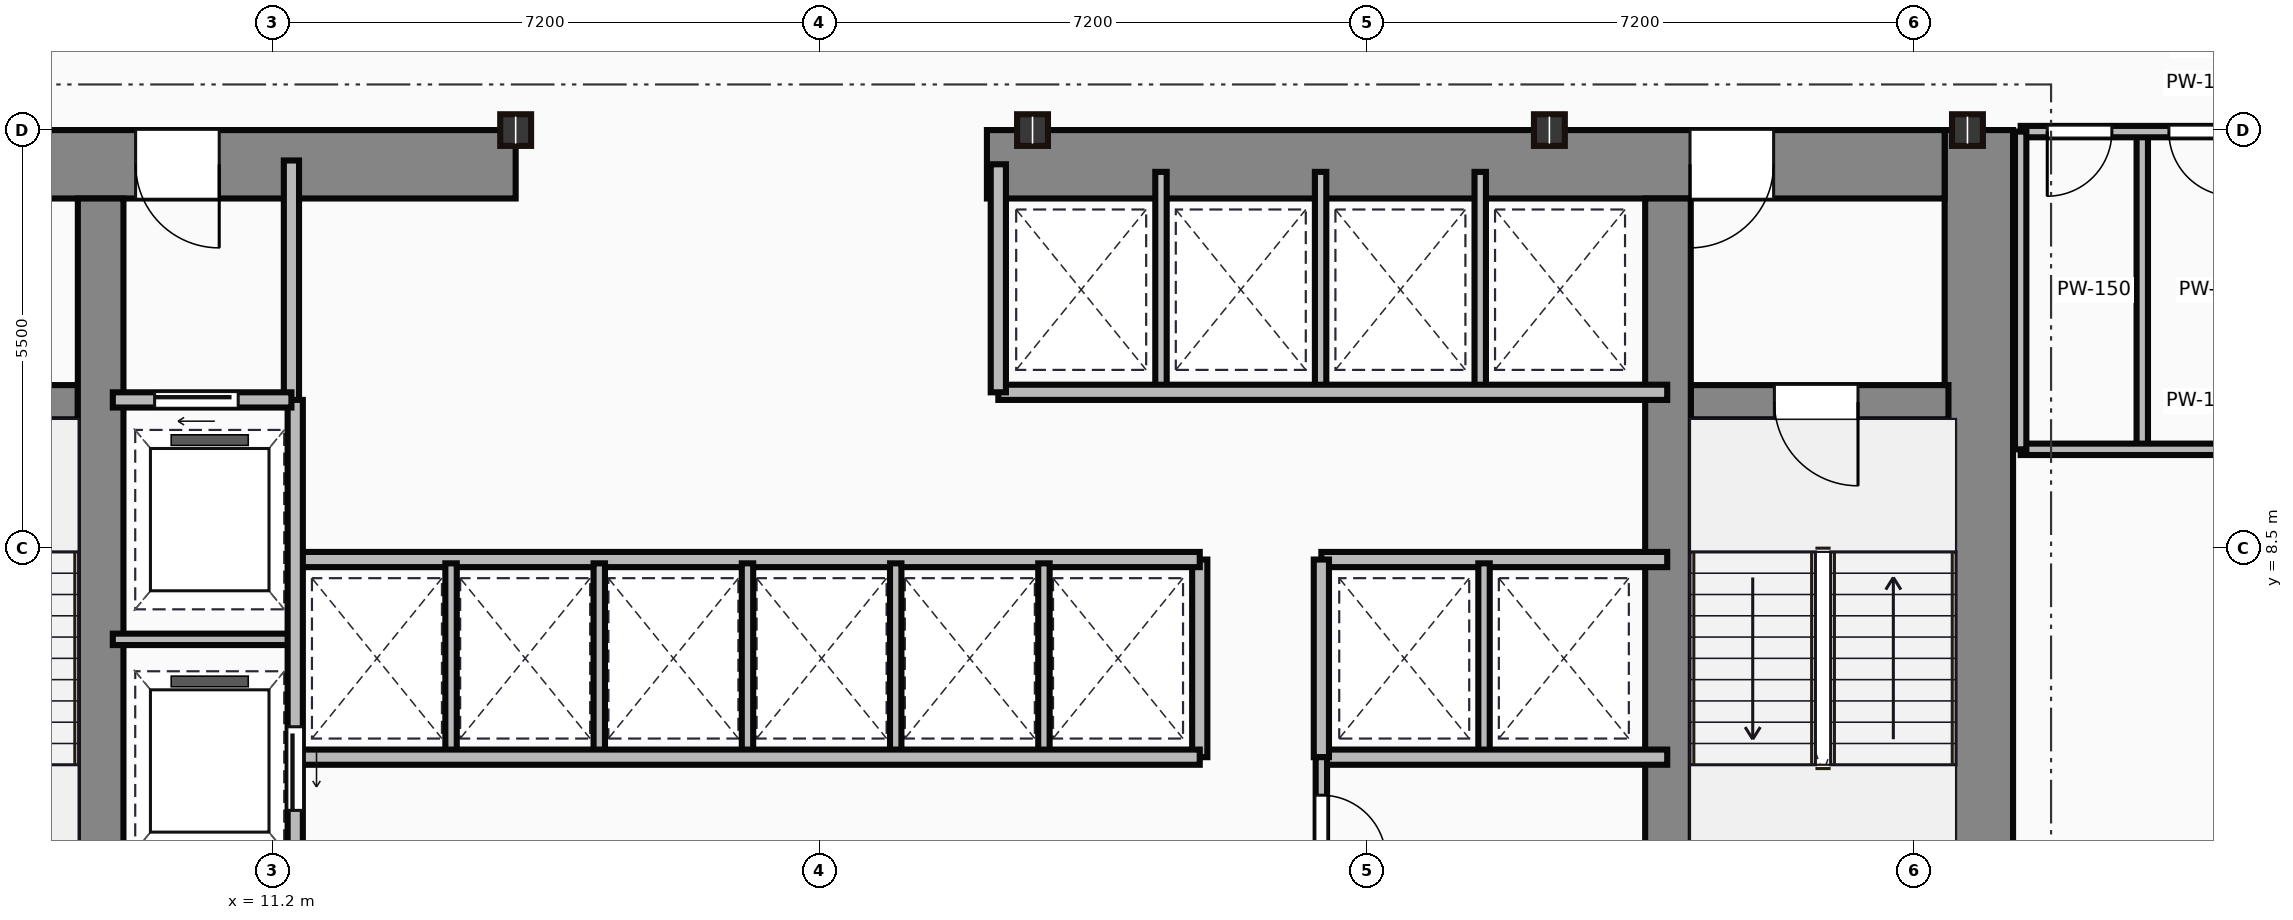
"""IFC4 building model, lengths in metres.
Left out: names, types, materials, properties, quantities, classifications, styles, units other than length and angle.
Written with IfcOpenShell. Run it as: python <this file> out.ifc"""

import sys

from ifc_helpers import new_model, si_unit, direction, frame, frame_2d, origin, origin_2d, place, context, subcontext, project, spatial, rectangle, i_section, extrude, source, transform, mapped, element, fill, save


model = new_model("IFC4")
c1 = context("Model", 3, precision=1e-05, world=origin(), true_north=direction((0.0, 1.0)))
c2 = subcontext(c1, "Body", "Model", "MODEL_VIEW")
j1 = project(units=[si_unit("LENGTHUNIT", "METRE"), si_unit("PLANEANGLEUNIT", "RADIAN")], contexts=[c1])
p1 = place(None, origin())
s1 = spatial("IfcSite", under=j1, at=p1, CompositionType="ELEMENT")
p2 = place(p1, origin())
s2 = spatial("IfcBuilding", under=s1, at=p2, CompositionType="ELEMENT")
p3 = place(p2, frame((0.0, 0.0, 39.8)))
s3 = spatial("IfcBuildingStorey", under=s2, at=p3, CompositionType="ELEMENT", Elevation=39.8)
m1 = source(origin(), c2, "Body", "SweptSolid", [
    extrude(rectangle(XDim=13.1, YDim=0.9, at=frame_2d((6.55, 0.0))), origin(), (0.0, 0.0, 1.0), 3.65),
])
p4 = place(p3, frame((33.65, 0.9, 0.0), z_axis=(0.0, 0.0, 1.0), x_axis=(0.0, 1.0, 0.0)))
e1 = element("IfcWall", 1, at=p4, inside=s3, PredefinedType="SHEAR", context=c2, shape_type="MappedRepresentation", body=[
    mapped(m1, transform((0.0, 0.0, 0.0))),
])
m2 = source(origin(), c2, "Body", "SweptSolid", [
    extrude(rectangle(XDim=9.1, YDim=0.9, at=frame_2d((4.55, 0.0))), origin(), (0.0, 0.0, 1.0), 3.65),
])
p5 = place(p3, frame((5.3, 13.55, 0.0), z_axis=(0.0, 0.0, 1.0), x_axis=(1.0, 0.0, 0.0)))
e2 = element("IfcWall", 2, at=p5, inside=s3, PredefinedType="SHEAR", context=c2, shape_type="MappedRepresentation", body=[
    mapped(m2, transform((0.0, 0.0, 0.0))),
])
p6 = place(p5, frame((4.1, 0.0, 0.0)))
e3 = element("IfcOpeningElement", 3, at=p6, cuts=e2, PredefinedType="OPENING", context=c2, shape_type="SweptSolid", body=[
    extrude(rectangle(XDim=1.1, YDim=2.15, at=frame_2d((0.55, 1.075))), frame((0.0, 0.46, 0.0), z_axis=(0.0, -1.0, 0.0), x_axis=(1.0, 0.0, 0.0)), (0.0, 0.0, 1.0), 0.92),
])
m3 = source(origin(), c2, "Body", "SweptSolid", [
    extrude(rectangle(XDim=12.6, YDim=0.9, at=frame_2d((6.3, 0.0))), origin(), (0.0, 0.0, 1.0), 3.65),
])
p7 = place(p3, frame((20.6, 13.55, 0.0), z_axis=(0.0, 0.0, 1.0), x_axis=(1.0, 0.0, 0.0)))
e4 = element("IfcWall", 4, at=p7, inside=s3, PredefinedType="SHEAR", context=c2, shape_type="MappedRepresentation", body=[
    mapped(m3, transform((0.0, 0.0, 0.0))),
])
p8 = place(p7, frame((9.25, 0.0, 0.0)))
e5 = element("IfcOpeningElement", 5, at=p8, cuts=e4, PredefinedType="OPENING", context=c2, shape_type="SweptSolid", body=[
    extrude(rectangle(XDim=1.1, YDim=2.15, at=frame_2d((0.55, 1.075))), frame((0.0, 0.46, 0.0), z_axis=(0.0, -1.0, 0.0), x_axis=(1.0, 0.0, 0.0)), (0.0, 0.0, 1.0), 0.92),
])
m4 = source(origin(), c2, "Body", "SweptSolid", [
    extrude(rectangle(XDim=12.2, YDim=0.6, at=frame_2d((6.1, 0.0))), origin(), (0.0, 0.0, 1.0), 3.65),
])
for number, where, z_axis, x_axis in (
    (6, (8.94, 0.9, 0.0), (0.0, 0.0, 1.0), (0.0, 1.0, 0.0)),
    (7, (29.56, 0.9, 0.0), (0.0, 0.0, 1.0), (0.0, 1.0, 0.0)),
):
    element("IfcWall", number, at=place(p3, frame(where, z_axis=z_axis, x_axis=x_axis)), inside=s3, PredefinedType="SHEAR", context=c2, shape_type="MappedRepresentation", body=[
        mapped(m4, transform((0.0, 0.0, 0.0))),
    ])
m5 = source(origin(), c2, "Body", "SweptSolid", [
    extrude(rectangle(XDim=3.39, YDim=0.45, at=frame_2d((1.695, 0.0))), origin(), (0.0, 0.0, 1.0), 3.65),
])
p9 = place(p3, frame((5.25, 10.42, 0.0), z_axis=(0.0, 0.0, 1.0), x_axis=(1.0, 0.0, 0.0)))
e8 = element("IfcWall", 8, at=p9, inside=s3, PredefinedType="SHEAR", context=c2, shape_type="MappedRepresentation", body=[
    mapped(m5, transform((0.0, 0.0, 0.0))),
])
p10 = place(p9, frame((1.05, 0.0, 0.0)))
e9 = element("IfcOpeningElement", 9, at=p10, cuts=e8, PredefinedType="OPENING", context=c2, shape_type="SweptSolid", body=[
    extrude(rectangle(XDim=1.1, YDim=2.15, at=frame_2d((0.55, 1.075))), frame((0.0, 0.235, 0.0), z_axis=(0.0, -1.0, 0.0), x_axis=(1.0, 0.0, 0.0)), (0.0, 0.0, 1.0), 0.47),
])
p11 = place(p3, frame((29.86, 10.42, 0.0), z_axis=(0.0, 0.0, 1.0), x_axis=(1.0, 0.0, 0.0)))
e10 = element("IfcWall", 10, at=p11, inside=s3, PredefinedType="SHEAR", context=c2, shape_type="MappedRepresentation", body=[
    mapped(m5, transform((0.0, 0.0, 0.0))),
])
p12 = place(p11, frame((1.1, 0.0, 0.0)))
e11 = element("IfcOpeningElement", 11, at=p12, cuts=e10, PredefinedType="OPENING", context=c2, shape_type="SweptSolid", body=[
    extrude(rectangle(XDim=1.1, YDim=2.15, at=frame_2d((0.55, 1.075))), frame((0.0, 0.235, 0.0), z_axis=(0.0, -1.0, 0.0), x_axis=(1.0, 0.0, 0.0)), (0.0, 0.0, 1.0), 0.47),
])
m6 = source(origin(), c2, "Body", "SweptSolid", [
    extrude(i_section(OverallWidth=0.406, OverallDepth=0.416, WebThickness=0.03, FlangeThickness=0.048, at=origin_2d()), origin(), (0.0, 0.0, 1.0), 3.65),
])
for number, where, z_axis, x_axis in (
    (12, (14.4, 14.0, 0.0), (0.0, 0.0, 1.0), (1.0, 0.0, 0.0)),
    (13, (21.2, 14.0, 0.0), (0.0, 0.0, 1.0), (1.0, 0.0, 0.0)),
    (14, (28.0, 14.0, 0.0), (0.0, 0.0, 1.0), (1.0, 0.0, 0.0)),
    (15, (33.5, 14.0, 0.0), (0.0, 0.0, 1.0), (1.0, 0.0, 0.0)),
):
    element("IfcColumn", number, at=place(p3, frame(where, z_axis=z_axis, x_axis=x_axis)), inside=s3, PredefinedType="COLUMN", context=c2, shape_type="MappedRepresentation", body=[
        mapped(m6, transform((0.0, 0.0, 0.0))),
    ])
m7 = source(origin(), c2, "Body", "SweptSolid", [
    extrude(rectangle(XDim=3.18, YDim=0.2, at=frame_2d((1.59, 0.0))), origin(), (0.0, 0.0, 1.0), 3.4),
])
p13 = place(p3, frame((11.45, 10.42, 0.0), z_axis=(0.0, 0.0, 1.0), x_axis=(0.0, 1.0, 0.0)))
e16 = element("IfcWall", 16, at=p13, inside=s3, PredefinedType="PARTITIONING", context=c2, shape_type="MappedRepresentation", body=[
    mapped(m7, transform((0.0, 0.0, 0.0))),
])
m8 = source(origin(), c2, "Body", "SweptSolid", [
    extrude(rectangle(XDim=2.35, YDim=0.2, at=frame_2d((1.175, 0.0))), origin(), (0.0, 0.0, 1.0), 3.4),
])
p14 = place(p3, frame((9.1, 10.45, 0.0), z_axis=(0.0, 0.0, 1.0), x_axis=(1.0, 0.0, 0.0)))
e17 = element("IfcWall", 17, at=p14, inside=s3, PredefinedType="PARTITIONING", context=c2, shape_type="MappedRepresentation", body=[
    mapped(m8, transform((0.0, 0.0, 0.0))),
])
p15 = place(p14, frame((0.55, 0.0, 0.0)))
e18 = element("IfcOpeningElement", 18, at=p15, cuts=e17, PredefinedType="OPENING", context=c2, shape_type="SweptSolid", body=[
    extrude(rectangle(XDim=1.1, YDim=2.15, at=frame_2d((0.55, 1.075))), frame((0.0, 0.11, 0.0), z_axis=(0.0, -1.0, 0.0), x_axis=(1.0, 0.0, 0.0)), (0.0, 0.0, 1.0), 0.22),
])
m9 = source(origin(), c2, "Body", "SweptSolid", [
    extrude(rectangle(XDim=9.6, YDim=0.2, at=frame_2d((4.8, 0.0))), origin(), (0.0, 0.0, 1.0), 3.4),
])
p16 = place(p3, frame((11.5, 0.85, 0.0), z_axis=(0.0, 0.0, 1.0), x_axis=(0.0, 1.0, 0.0)))
e19 = element("IfcWall", 19, at=p16, inside=s3, PredefinedType="PARTITIONING", context=c2, shape_type="MappedRepresentation", body=[
    mapped(m9, transform((0.0, 0.0, 0.0))),
])
p17 = place(p16, frame((4.2, 0.0, 0.0)))
e20 = element("IfcOpeningElement", 20, at=p17, cuts=e19, PredefinedType="OPENING", context=c2, shape_type="SweptSolid", body=[
    extrude(rectangle(XDim=1.1, YDim=2.15, at=frame_2d((0.55, 1.075))), frame((0.0, 0.11, 0.0), z_axis=(0.0, -1.0, 0.0), x_axis=(1.0, 0.0, 0.0)), (0.0, 0.0, 1.0), 0.22),
])
p18 = place(p16, frame((0.9, 0.0, 0.0)))
e21 = element("IfcOpeningElement", 21, at=p18, cuts=e19, PredefinedType="OPENING", context=c2, shape_type="SweptSolid", body=[
    extrude(rectangle(XDim=1.2, YDim=2.15, at=frame_2d((0.6, 1.075))), frame((0.0, 0.11, 0.0), z_axis=(0.0, -1.0, 0.0), x_axis=(1.0, 0.0, 0.0)), (0.0, 0.0, 1.0), 0.22),
])
m10 = source(origin(), c2, "Body", "SweptSolid", [
    extrude(rectangle(XDim=2.4, YDim=0.15, at=frame_2d((1.2, 0.0))), origin(), (0.0, 0.0, 1.0), 3.4),
])
p19 = place(p3, frame((9.1, 7.3, 0.0), z_axis=(0.0, 0.0, 1.0), x_axis=(1.0, 0.0, 0.0)))
e22 = element("IfcWall", 22, at=p19, inside=s3, PredefinedType="PARTITIONING", context=c2, shape_type="MappedRepresentation", body=[
    mapped(m10, transform((0.0, 0.0, 0.0))),
])
m11 = source(origin(), c2, "Body", "SweptSolid", [
    extrude(rectangle(XDim=11.85, YDim=0.2, at=frame_2d((5.925, 0.0))), origin(), (0.0, 0.0, 1.0), 3.4),
])
for number, where, z_axis, x_axis in (
    (23, (11.55, 5.75, 0.0), (0.0, 0.0, 1.0), (1.0, 0.0, 0.0)),
    (24, (11.55, 8.35, 0.0), (0.0, 0.0, 1.0), (1.0, 0.0, 0.0)),
):
    element("IfcWall", number, at=place(p3, frame(where, z_axis=z_axis, x_axis=x_axis)), inside=s3, PredefinedType="PARTITIONING", context=c2, shape_type="MappedRepresentation", body=[
        mapped(m11, transform((0.0, 0.0, 0.0))),
    ])
m12 = source(origin(), c2, "Body", "SweptSolid", [
    extrude(rectangle(XDim=2.6, YDim=0.2, at=frame_2d((1.3, 0.0))), origin(), (0.0, 0.0, 1.0), 3.4),
])
p20 = place(p3, frame((23.4, 5.75, 0.0), z_axis=(0.0, 0.0, 1.0), x_axis=(0.0, 1.0, 0.0)))
e25 = element("IfcWall", 25, at=p20, inside=s3, PredefinedType="PARTITIONING", context=c2, shape_type="MappedRepresentation", body=[
    mapped(m12, transform((0.0, 0.0, 0.0))),
])
m13 = source(origin(), c2, "Body", "SweptSolid", [
    extrude(rectangle(XDim=2.5, YDim=0.15, at=frame_2d((1.25, 0.0))), origin(), (0.0, 0.0, 1.0), 3.4),
])
for number, where, z_axis, x_axis in (
    (26, (13.55, 5.8, 0.0), (0.0, 0.0, 1.0), (0.0, 1.0, 0.0)),
    (27, (15.5, 5.8, 0.0), (0.0, 0.0, 1.0), (0.0, 1.0, 0.0)),
    (28, (17.45, 5.8, 0.0), (0.0, 0.0, 1.0), (0.0, 1.0, 0.0)),
    (29, (19.4, 5.8, 0.0), (0.0, 0.0, 1.0), (0.0, 1.0, 0.0)),
    (30, (21.35, 5.8, 0.0), (0.0, 0.0, 1.0), (0.0, 1.0, 0.0)),
):
    element("IfcWall", number, at=place(p3, frame(where, z_axis=z_axis, x_axis=x_axis)), inside=s3, PredefinedType="PARTITIONING", context=c2, shape_type="MappedRepresentation", body=[
        mapped(m13, transform((0.0, 0.0, 0.0))),
    ])
m14 = source(origin(), c2, "Body", "SweptSolid", [
    extrude(rectangle(XDim=8.8, YDim=0.2, at=frame_2d((4.4, 0.0))), origin(), (0.0, 0.0, 1.0), 3.4),
])
p21 = place(p3, frame((20.75, 10.55, 0.0), z_axis=(0.0, 0.0, 1.0), x_axis=(1.0, 0.0, 0.0)))
e31 = element("IfcWall", 31, at=p21, inside=s3, PredefinedType="PARTITIONING", context=c2, shape_type="MappedRepresentation", body=[
    mapped(m14, transform((0.0, 0.0, 0.0))),
])
m15 = source(origin(), c2, "Body", "SweptSolid", [
    extrude(rectangle(XDim=3.0, YDim=0.2, at=frame_2d((1.5, 0.0))), origin(), (0.0, 0.0, 1.0), 3.4),
])
p22 = place(p3, frame((20.75, 10.55, 0.0), z_axis=(0.0, 0.0, 1.0), x_axis=(0.0, 1.0, 0.0)))
e32 = element("IfcWall", 32, at=p22, inside=s3, PredefinedType="PARTITIONING", context=c2, shape_type="MappedRepresentation", body=[
    mapped(m15, transform((0.0, 0.0, 0.0))),
])
m16 = source(origin(), c2, "Body", "SweptSolid", [
    extrude(rectangle(XDim=2.85, YDim=0.15, at=frame_2d((1.425, 0.0))), origin(), (0.0, 0.0, 1.0), 3.4),
])
for number, where, z_axis, x_axis in (
    (33, (22.89, 10.6, 0.0), (0.0, 0.0, 1.0), (0.0, 1.0, 0.0)),
    (34, (24.99, 10.6, 0.0), (0.0, 0.0, 1.0), (0.0, 1.0, 0.0)),
    (35, (27.09, 10.6, 0.0), (0.0, 0.0, 1.0), (0.0, 1.0, 0.0)),
):
    element("IfcWall", number, at=place(p3, frame(where, z_axis=z_axis, x_axis=x_axis)), inside=s3, PredefinedType="PARTITIONING", context=c2, shape_type="MappedRepresentation", body=[
        mapped(m16, transform((0.0, 0.0, 0.0))),
    ])
m17 = source(origin(), c2, "Body", "SweptSolid", [
    extrude(rectangle(XDim=4.55, YDim=0.2, at=frame_2d((2.275, 0.0))), origin(), (0.0, 0.0, 1.0), 3.4),
])
for number, where, z_axis, x_axis in (
    (36, (25.0, 8.35, 0.0), (0.0, 0.0, 1.0), (1.0, 0.0, 0.0)),
    (37, (25.0, 5.75, 0.0), (0.0, 0.0, 1.0), (1.0, 0.0, 0.0)),
):
    element("IfcWall", number, at=place(p3, frame(where, z_axis=z_axis, x_axis=x_axis)), inside=s3, PredefinedType="PARTITIONING", context=c2, shape_type="MappedRepresentation", body=[
        mapped(m17, transform((0.0, 0.0, 0.0))),
    ])
p23 = place(p3, frame((25.0, 5.75, 0.0), z_axis=(0.0, 0.0, 1.0), x_axis=(0.0, 1.0, 0.0)))
e38 = element("IfcWall", 38, at=p23, inside=s3, PredefinedType="PARTITIONING", context=c2, shape_type="MappedRepresentation", body=[
    mapped(m12, transform((0.0, 0.0, 0.0))),
])
p24 = place(p3, frame((27.14, 5.8, 0.0), z_axis=(0.0, 0.0, 1.0), x_axis=(0.0, 1.0, 0.0)))
e39 = element("IfcWall", 39, at=p24, inside=s3, PredefinedType="PARTITIONING", context=c2, shape_type="MappedRepresentation", body=[
    mapped(m13, transform((0.0, 0.0, 0.0))),
])
m18 = source(origin(), c2, "Body", "SweptSolid", [
    extrude(rectangle(XDim=4.9, YDim=0.15, at=frame_2d((2.45, 0.0))), origin(), (0.0, 0.0, 1.0), 3.4),
])
p25 = place(p3, frame((25.0, 0.85, 0.0), z_axis=(0.0, 0.0, 1.0), x_axis=(0.0, 1.0, 0.0)))
e40 = element("IfcWall", 40, at=p25, inside=s3, PredefinedType="PARTITIONING", context=c2, shape_type="MappedRepresentation", body=[
    mapped(m18, transform((0.0, 0.0, 0.0))),
])
p26 = place(p25, frame((1.85, 0.0, 0.0)))
e41 = element("IfcOpeningElement", 41, at=p26, cuts=e40, PredefinedType="OPENING", context=c2, shape_type="SweptSolid", body=[
    extrude(rectangle(XDim=0.95, YDim=2.15, at=frame_2d((0.475, 1.075))), frame((0.0, 0.085, 0.0), z_axis=(0.0, -1.0, 0.0), x_axis=(1.0, 0.0, 0.0)), (0.0, 0.0, 1.0), 0.17),
])
p27 = place(p25, frame((3.55, 0.0, 0.0)))
e42 = element("IfcOpeningElement", 42, at=p27, cuts=e40, PredefinedType="OPENING", context=c2, shape_type="SweptSolid", body=[
    extrude(rectangle(XDim=0.85, YDim=2.15, at=frame_2d((0.425, 1.075))), frame((0.0, 0.085, 0.0), z_axis=(0.0, -1.0, 0.0), x_axis=(1.0, 0.0, 0.0)), (0.0, 0.0, 1.0), 0.17),
])
m19 = source(origin(), c2, "Body", "SweptSolid", [
    extrude(rectangle(XDim=4.8, YDim=0.15, at=frame_2d((2.4, 0.0))), origin(), (0.0, 0.0, 1.0), 2.625),
])
p28 = place(p3, frame((34.2, 13.98, 0.0), z_axis=(0.0, 0.0, 1.0), x_axis=(1.0, 0.0, 0.0)))
e43 = element("IfcWall", 43, at=p28, inside=s3, PredefinedType="PARTITIONING", context=c2, shape_type="MappedRepresentation", body=[
    mapped(m19, transform((0.0, 0.0, 0.0))),
])
p29 = place(p28, frame((0.35, 0.0, 0.0)))
e44 = element("IfcOpeningElement", 44, at=p29, cuts=e43, PredefinedType="OPENING", context=c2, shape_type="SweptSolid", body=[
    extrude(rectangle(XDim=0.85, YDim=2.1, at=frame_2d((0.425, 1.05))), frame((0.0, 0.085, 0.0), z_axis=(0.0, -1.0, 0.0), x_axis=(1.0, 0.0, 0.0)), (0.0, 0.0, 1.0), 0.17),
])
p30 = place(p28, frame((1.95, 0.0, 0.0)))
e45 = element("IfcOpeningElement", 45, at=p30, cuts=e43, PredefinedType="OPENING", context=c2, shape_type="SweptSolid", body=[
    extrude(rectangle(XDim=0.85, YDim=2.1, at=frame_2d((0.425, 1.05))), frame((0.0, 0.085, 0.0), z_axis=(0.0, -1.0, 0.0), x_axis=(1.0, 0.0, 0.0)), (0.0, 0.0, 1.0), 0.17),
])
p31 = place(p28, frame((3.5, 0.0, 0.0)))
e46 = element("IfcOpeningElement", 46, at=p31, cuts=e43, PredefinedType="OPENING", context=c2, shape_type="SweptSolid", body=[
    extrude(rectangle(XDim=0.9, YDim=2.1, at=frame_2d((0.45, 1.05))), frame((0.0, 0.085, 0.0), z_axis=(0.0, -1.0, 0.0), x_axis=(1.0, 0.0, 0.0)), (0.0, 0.0, 1.0), 0.17),
])
m20 = source(origin(), c2, "Body", "SweptSolid", [
    extrude(rectangle(XDim=4.8, YDim=0.15, at=frame_2d((2.4, 0.0))), origin(), (0.0, 0.0, 1.0), 3.4),
])
p32 = place(p3, frame((34.2, 9.8, 0.0), z_axis=(0.0, 0.0, 1.0), x_axis=(1.0, 0.0, 0.0)))
e47 = element("IfcWall", 47, at=p32, inside=s3, PredefinedType="PARTITIONING", context=c2, shape_type="MappedRepresentation", body=[
    mapped(m20, transform((0.0, 0.0, 0.0))),
])
m21 = source(origin(), c2, "Body", "SweptSolid", [
    extrude(rectangle(XDim=4.18, YDim=0.15, at=frame_2d((2.09, 0.0))), origin(), (0.0, 0.0, 1.0), 3.4),
])
for number, where, z_axis, x_axis in (
    (48, (34.2, 9.8, 0.0), (0.0, 0.0, 1.0), (0.0, 1.0, 0.0)),
    (49, (35.8, 9.8, 0.0), (0.0, 0.0, 1.0), (0.0, 1.0, 0.0)),
):
    element("IfcWall", number, at=place(p3, frame(where, z_axis=z_axis, x_axis=x_axis)), inside=s3, PredefinedType="PARTITIONING", context=c2, shape_type="MappedRepresentation", body=[
        mapped(m21, transform((0.0, 0.0, 0.0))),
    ])
m22 = source(origin(), c2, "Body", "SweptSolid", [
    extrude(rectangle(XDim=1.1, YDim=2.15, at=frame_2d((0.55, 1.075))), frame((0.0, 0.025, 0.0), z_axis=(0.0, -1.0, 0.0), x_axis=(1.0, 0.0, 0.0)), (0.0, 0.0, 1.0), 0.05),
])
p33 = place(p12, frame((1.1, 0.0, 0.0), z_axis=(0.0, 0.0, 1.0), x_axis=(-1.0, 0.0, 0.0)))
e50 = element("IfcDoor", 50, at=p33, inside=s3, OperationType="SINGLE_SWING_RIGHT", PredefinedType="DOOR", context=c2, shape_type="MappedRepresentation", body=[
    mapped(m22, transform((0.0, 0.0, 0.0))),
])
fill(e11, e50)
p34 = place(p6, origin())
e51 = element("IfcDoor", 51, at=p34, inside=s3, OperationType="SINGLE_SWING_RIGHT", PredefinedType="DOOR", context=c2, shape_type="MappedRepresentation", body=[
    mapped(m22, transform((0.0, 0.0, 0.0))),
])
fill(e3, e51)
p35 = place(p8, origin())
e52 = element("IfcDoor", 52, at=p35, inside=s3, OperationType="SINGLE_SWING_LEFT", PredefinedType="DOOR", context=c2, shape_type="MappedRepresentation", body=[
    mapped(m22, transform((0.0, 0.0, 0.0))),
])
fill(e5, e52)
p36 = place(p15, origin())
e53 = element("IfcDoor", 53, at=p36, inside=s3, OperationType="SLIDING_TO_LEFT", PredefinedType="DOOR", context=c2, shape_type="MappedRepresentation", body=[
    mapped(m22, transform((0.0, 0.0, 0.0))),
])
fill(e18, e53)
p37 = place(p17, frame((1.1, 0.0, 0.0), z_axis=(0.0, 0.0, 1.0), x_axis=(-1.0, 0.0, 0.0)))
e54 = element("IfcDoor", 54, at=p37, inside=s3, OperationType="SLIDING_TO_LEFT", PredefinedType="DOOR", context=c2, shape_type="MappedRepresentation", body=[
    mapped(m22, transform((0.0, 0.0, 0.0))),
])
fill(e20, e54)
m23 = source(origin(), c2, "Body", "SweptSolid", [
    extrude(rectangle(XDim=0.85, YDim=2.15, at=frame_2d((0.425, 1.075))), frame((0.0, 0.025, 0.0), z_axis=(0.0, -1.0, 0.0), x_axis=(1.0, 0.0, 0.0)), (0.0, 0.0, 1.0), 0.05),
])
p38 = place(p27, origin())
e55 = element("IfcDoor", 55, at=p38, inside=s3, OperationType="SINGLE_SWING_LEFT", PredefinedType="DOOR", context=c2, shape_type="MappedRepresentation", body=[
    mapped(m23, transform((0.0, 0.0, 0.0))),
])
fill(e42, e55)
m24 = source(origin(), c2, "Body", "SweptSolid", [
    extrude(rectangle(XDim=0.85, YDim=2.1, at=frame_2d((0.425, 1.05))), frame((0.0, 0.025, 0.0), z_axis=(0.0, -1.0, 0.0), x_axis=(1.0, 0.0, 0.0)), (0.0, 0.0, 1.0), 0.05),
])
p39 = place(p29, frame((0.85, 0.0, 0.0), z_axis=(0.0, 0.0, 1.0), x_axis=(-1.0, 0.0, 0.0)))
e56 = element("IfcDoor", 56, at=p39, inside=s3, OperationType="SINGLE_SWING_LEFT", PredefinedType="DOOR", context=c2, shape_type="MappedRepresentation", body=[
    mapped(m24, transform((0.0, 0.0, 0.0))),
])
fill(e44, e56)
p40 = place(p30, frame((0.85, 0.0, 0.0), z_axis=(0.0, 0.0, 1.0), x_axis=(-1.0, 0.0, 0.0)))
e57 = element("IfcDoor", 57, at=p40, inside=s3, OperationType="SINGLE_SWING_RIGHT", PredefinedType="DOOR", context=c2, shape_type="MappedRepresentation", body=[
    mapped(m24, transform((0.0, 0.0, 0.0))),
])
fill(e45, e57)
save(model, sys.argv[1])
